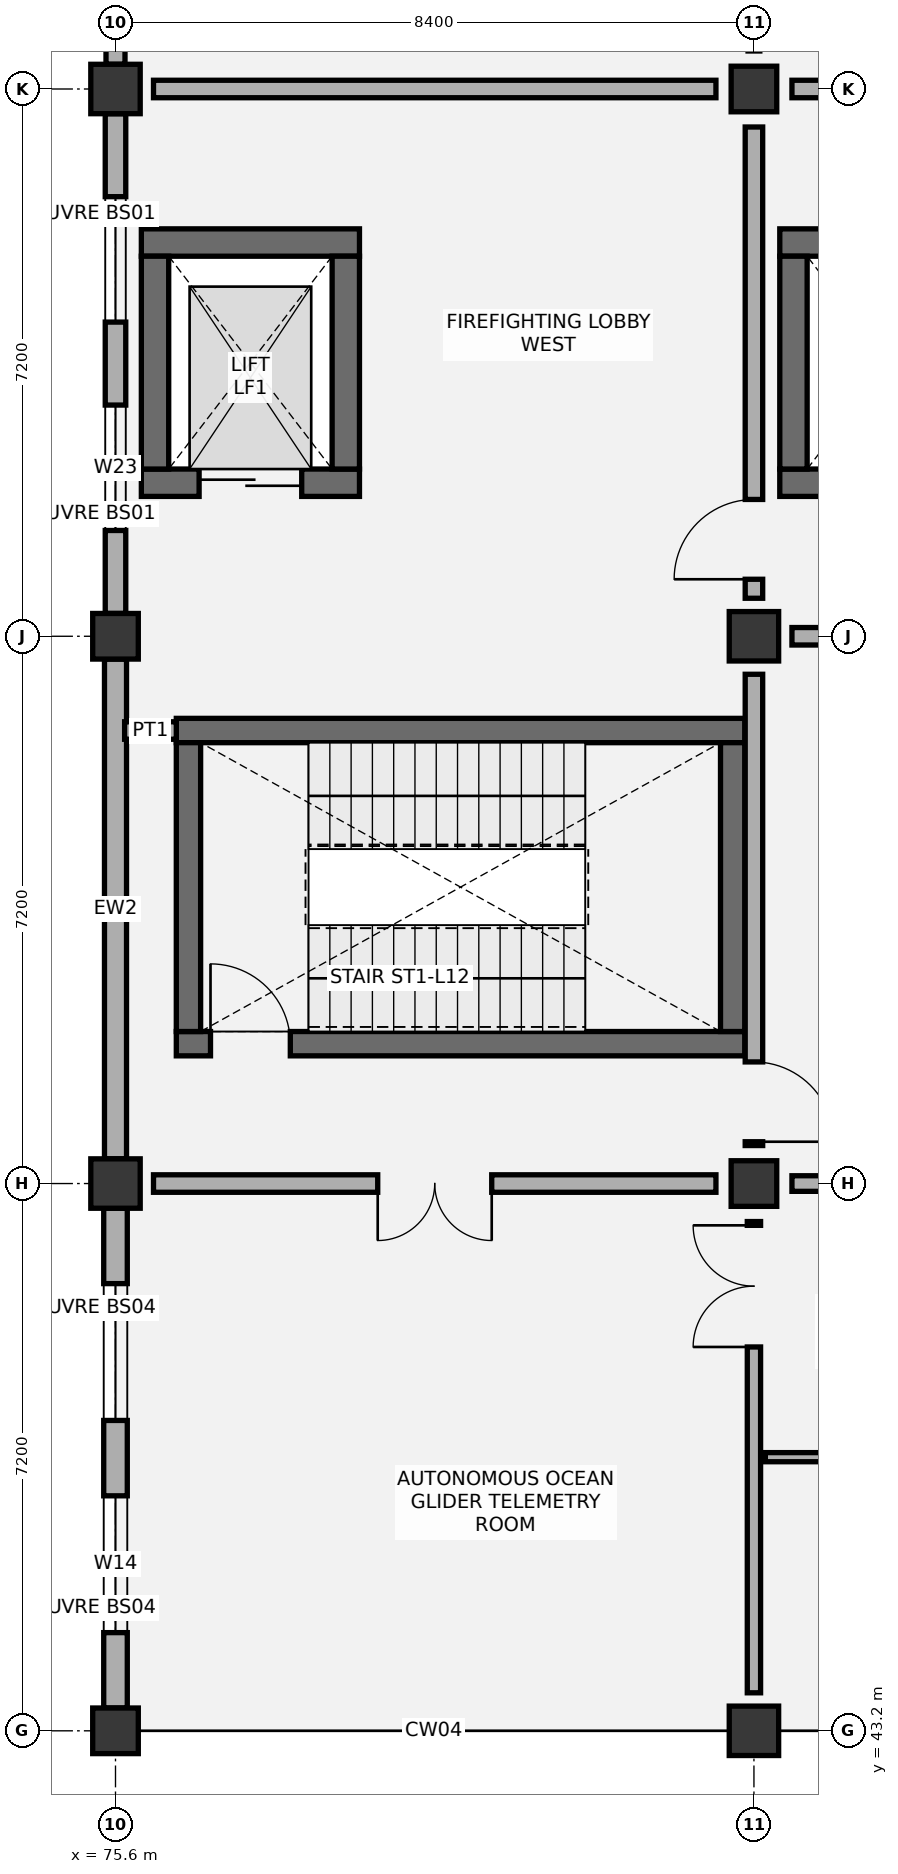
"""IFC4 building model, lengths in metres.
Left out: names, types, materials, properties, quantities, classifications, styles, units other than length and angle.
Written with IfcOpenShell. Run it as: python <this file> out.ifc"""

import sys

from ifc_helpers import new_model, si_unit, direction, frame, frame_2d, origin, origin_2d, place, context, subcontext, project, spatial, rectangle, extrude, element, fill, save


model = new_model("IFC4")
c1 = context("Model", 3, precision=1e-05, world=origin(), true_north=direction((0.0, 1.0)))
c2 = subcontext(c1, "Body", "Model", "MODEL_VIEW")
j1 = project(units=[si_unit("LENGTHUNIT", "METRE"), si_unit("PLANEANGLEUNIT", "RADIAN")], contexts=[c1])
p1 = place(None, origin())
s1 = spatial("IfcSite", under=j1, at=p1, CompositionType="ELEMENT")
p2 = place(p1, origin())
s2 = spatial("IfcBuilding", under=s1, at=p2, CompositionType="ELEMENT")
p3 = place(p2, frame((0.0, 0.0, 56.4)))
s3 = spatial("IfcBuildingStorey", under=s2, at=p3, CompositionType="ELEMENT", Elevation=56.4)
p4 = place(p3, frame((75.6, 43.2, 0.0), z_axis=(0.0, 0.0, 1.0), x_axis=(1.0, 0.0, 0.0)))
e1 = element("IfcColumn", 1, at=p4, inside=s3, PredefinedType="COLUMN", context=c2, shape_type="SweptSolid", body=[
    extrude(rectangle(XDim=0.6, YDim=0.6, at=origin_2d()), origin(), (0.0, 0.0, 1.0), 4.2),
])
p5 = place(p3, frame((75.6, 50.4, 0.0), z_axis=(0.0, 0.0, 1.0), x_axis=(1.0, 0.0, 0.0)))
e2 = element("IfcColumn", 2, at=p5, inside=s3, PredefinedType="COLUMN", context=c2, shape_type="SweptSolid", body=[
    extrude(rectangle(XDim=0.65, YDim=0.65, at=origin_2d()), origin(), (0.0, 0.0, 1.0), 4.2),
])
p6 = place(p3, frame((75.6, 57.6, 0.0), z_axis=(0.0, 0.0, 1.0), x_axis=(1.0, 0.0, 0.0)))
e3 = element("IfcColumn", 3, at=p6, inside=s3, PredefinedType="COLUMN", context=c2, shape_type="SweptSolid", body=[
    extrude(rectangle(XDim=0.6, YDim=0.6, at=origin_2d()), origin(), (0.0, 0.0, 1.0), 4.2),
])
for number, where, z_axis, x_axis in (
    (4, (75.6, 64.8, 0.0), (0.0, 0.0, 1.0), (1.0, 0.0, 0.0)),
    (5, (84.0, 43.2, 0.0), (0.0, 0.0, 1.0), (1.0, 0.0, 0.0)),
):
    element("IfcColumn", number, at=place(p3, frame(where, z_axis=z_axis, x_axis=x_axis)), inside=s3, PredefinedType="COLUMN", context=c2, shape_type="SweptSolid", body=[
        extrude(rectangle(XDim=0.65, YDim=0.65, at=origin_2d()), origin(), (0.0, 0.0, 1.0), 4.2),
    ])
p7 = place(p3, frame((84.0, 50.4, 0.0), z_axis=(0.0, 0.0, 1.0), x_axis=(1.0, 0.0, 0.0)))
e6 = element("IfcColumn", 6, at=p7, inside=s3, PredefinedType="COLUMN", context=c2, shape_type="SweptSolid", body=[
    extrude(rectangle(XDim=0.6, YDim=0.6, at=origin_2d()), origin(), (0.0, 0.0, 1.0), 4.2),
])
p8 = place(p3, frame((84.0, 57.6, 0.0), z_axis=(0.0, 0.0, 1.0), x_axis=(1.0, 0.0, 0.0)))
e7 = element("IfcColumn", 7, at=p8, inside=s3, PredefinedType="COLUMN", context=c2, shape_type="SweptSolid", body=[
    extrude(rectangle(XDim=0.65, YDim=0.65, at=origin_2d()), origin(), (0.0, 0.0, 1.0), 4.2),
])
p9 = place(p3, frame((84.0, 64.8, 0.0), z_axis=(0.0, 0.0, 1.0), x_axis=(1.0, 0.0, 0.0)))
e8 = element("IfcColumn", 8, at=p9, inside=s3, PredefinedType="COLUMN", context=c2, shape_type="SweptSolid", body=[
    extrude(rectangle(XDim=0.6, YDim=0.6, at=origin_2d()), origin(), (0.0, 0.0, 1.0), 4.2),
])
p10 = place(p3, frame((76.4, 52.24, 0.0), z_axis=(0.0, 0.0, 1.0), x_axis=(1.0, 0.0, 0.0)))
e9 = element("IfcWall", 9, at=p10, inside=s3, PredefinedType="SHEAR", context=c2, shape_type="SweptSolid", body=[
    extrude(rectangle(XDim=7.48, YDim=0.32, at=frame_2d((3.74, 0.0))), origin(), (0.0, 0.0, 1.0), 3.92),
])
p11 = place(p10, frame((0.45, 0.0, 0.0)))
e10 = element("IfcOpeningElement", 10, at=p11, cuts=e9, PredefinedType="OPENING", context=c2, shape_type="SweptSolid", body=[
    extrude(rectangle(XDim=1.05, YDim=2.15, at=frame_2d((0.525, 1.075))), frame((0.0, 0.17, 0.0), z_axis=(0.0, -1.0, 0.0), x_axis=(1.0, 0.0, 0.0)), (0.0, 0.0, 1.0), 0.34),
])
p12 = place(p3, frame((76.4, 56.36, 0.0), z_axis=(0.0, 0.0, 1.0), x_axis=(1.0, 0.0, 0.0)))
e11 = element("IfcWall", 11, at=p12, inside=s3, PredefinedType="SHEAR", context=c2, shape_type="SweptSolid", body=[
    extrude(rectangle(XDim=7.48, YDim=0.32, at=frame_2d((3.74, 0.0))), origin(), (0.0, 0.0, 1.0), 3.92),
])
for number, where, z_axis, x_axis in (
    (12, (76.56, 52.4, 0.0), (0.0, 0.0, 1.0), (0.0, 1.0, 0.0)),
    (13, (83.72, 52.4, 0.0), (0.0, 0.0, 1.0), (0.0, 1.0, 0.0)),
):
    element("IfcWall", number, at=place(p3, frame(where, z_axis=z_axis, x_axis=x_axis)), inside=s3, PredefinedType="SHEAR", context=c2, shape_type="SweptSolid", body=[
        extrude(rectangle(XDim=3.8, YDim=0.32, at=frame_2d((1.9, 0.0))), origin(), (0.0, 0.0, 1.0), 3.92),
    ])
p13 = place(p3, frame((75.94, 62.78, 0.0), z_axis=(0.0, 0.0, 1.0), x_axis=(1.0, 0.0, 0.0)))
e14 = element("IfcWall", 14, at=p13, inside=s3, PredefinedType="SHEAR", context=c2, shape_type="SweptSolid", body=[
    extrude(rectangle(XDim=2.87, YDim=0.36, at=frame_2d((1.435, 0.0))), origin(), (0.0, 0.0, 1.0), 3.92),
])
p14 = place(p3, frame((75.94, 59.62, 0.0), z_axis=(0.0, 0.0, 1.0), x_axis=(1.0, 0.0, 0.0)))
e15 = element("IfcWall", 15, at=p14, inside=s3, PredefinedType="SHEAR", context=c2, shape_type="SweptSolid", body=[
    extrude(rectangle(XDim=2.87, YDim=0.36, at=frame_2d((1.435, 0.0))), origin(), (0.0, 0.0, 1.0), 3.92),
])
p15 = place(p14, frame((0.76, 0.0, 0.0)))
e16 = element("IfcOpeningElement", 16, at=p15, cuts=e15, PredefinedType="OPENING", context=c2, shape_type="SweptSolid", body=[
    extrude(rectangle(XDim=1.35, YDim=2.2, at=frame_2d((0.675, 1.1))), frame((0.0, 0.19, 0.0), z_axis=(0.0, -1.0, 0.0), x_axis=(1.0, 0.0, 0.0)), (0.0, 0.0, 1.0), 0.38),
])
for number, where, z_axis, x_axis in (
    (17, (76.12, 59.8, 0.0), (0.0, 0.0, 1.0), (0.0, 1.0, 0.0)),
    (18, (78.63, 59.8, 0.0), (0.0, 0.0, 1.0), (0.0, 1.0, 0.0)),
):
    element("IfcWall", number, at=place(p3, frame(where, z_axis=z_axis, x_axis=x_axis)), inside=s3, PredefinedType="SHEAR", context=c2, shape_type="SweptSolid", body=[
        extrude(rectangle(XDim=2.8, YDim=0.36, at=frame_2d((1.4, 0.0))), origin(), (0.0, 0.0, 1.0), 3.92),
    ])
p16 = place(p3, frame((84.34, 62.78, 0.0), z_axis=(0.0, 0.0, 1.0), x_axis=(1.0, 0.0, 0.0)))
e19 = element("IfcWall", 19, at=p16, inside=s3, PredefinedType="SHEAR", context=c2, shape_type="SweptSolid", body=[
    extrude(rectangle(XDim=7.77, YDim=0.36, at=frame_2d((3.885, 0.0))), origin(), (0.0, 0.0, 1.0), 3.92),
])
p17 = place(p3, frame((84.34, 59.62, 0.0), z_axis=(0.0, 0.0, 1.0), x_axis=(1.0, 0.0, 0.0)))
e20 = element("IfcWall", 20, at=p17, inside=s3, PredefinedType="SHEAR", context=c2, shape_type="SweptSolid", body=[
    extrude(rectangle(XDim=2.66, YDim=0.36, at=frame_2d((1.33, 0.0))), origin(), (0.0, 0.0, 1.0), 3.92),
])
p18 = place(p17, frame((0.78, 0.0, 0.0)))
e21 = element("IfcOpeningElement", 21, at=p18, cuts=e20, PredefinedType="OPENING", context=c2, shape_type="SweptSolid", body=[
    extrude(rectangle(XDim=1.1, YDim=2.15, at=frame_2d((0.55, 1.075))), frame((0.0, 0.19, 0.0), z_axis=(0.0, -1.0, 0.0), x_axis=(1.0, 0.0, 0.0)), (0.0, 0.0, 1.0), 0.38),
])
p19 = place(p3, frame((84.52, 59.8, 0.0), z_axis=(0.0, 0.0, 1.0), x_axis=(0.0, 1.0, 0.0)))
e22 = element("IfcWall", 22, at=p19, inside=s3, PredefinedType="SHEAR", context=c2, shape_type="SweptSolid", body=[
    extrude(rectangle(XDim=2.8, YDim=0.36, at=frame_2d((1.4, 0.0))), origin(), (0.0, 0.0, 1.0), 3.92),
])
p20 = place(p3, frame((75.6, 43.5, 0.0), z_axis=(0.0, 0.0, 1.0), x_axis=(0.0, 1.0, 0.0)))
e23 = element("IfcWall", 23, at=p20, inside=s3, PredefinedType="SOLIDWALL", context=c2, shape_type="SweptSolid", body=[
    extrude(rectangle(XDim=6.575, YDim=0.31, at=frame_2d((3.288, 0.0))), origin(), (0.0, 0.0, 1.0), 3.365),
])
p21 = place(p20, frame((0.992, 0.0, 0.95)))
e24 = element("IfcOpeningElement", 24, at=p21, cuts=e23, PredefinedType="OPENING", context=c2, shape_type="SweptSolid", body=[
    extrude(rectangle(XDim=1.8, YDim=1.5, at=frame_2d((0.9, 0.75))), frame((0.0, 0.165, 0.0), z_axis=(0.0, -1.0, 0.0), x_axis=(1.0, 0.0, 0.0)), (0.0, 0.0, 1.0), 0.33),
])
p22 = place(p20, frame((3.783, 0.0, 0.95)))
e25 = element("IfcOpeningElement", 25, at=p22, cuts=e23, PredefinedType="OPENING", context=c2, shape_type="SweptSolid", body=[
    extrude(rectangle(XDim=1.8, YDim=1.5, at=frame_2d((0.9, 0.75))), frame((0.0, 0.165, 0.0), z_axis=(0.0, -1.0, 0.0), x_axis=(1.0, 0.0, 0.0)), (0.0, 0.0, 1.0), 0.33),
])
p23 = place(p3, frame((75.6, 50.725, 0.0), z_axis=(0.0, 0.0, 1.0), x_axis=(0.0, 1.0, 0.0)))
e26 = element("IfcWall", 26, at=p23, inside=s3, PredefinedType="SOLIDWALL", context=c2, shape_type="SweptSolid", body=[
    extrude(rectangle(XDim=6.575, YDim=0.29, at=frame_2d((3.288, 0.0))), origin(), (0.0, 0.0, 1.0), 3.365),
])
p24 = place(p3, frame((75.6, 57.9, 0.0), z_axis=(0.0, 0.0, 1.0), x_axis=(0.0, 1.0, 0.0)))
e27 = element("IfcWall", 27, at=p24, inside=s3, PredefinedType="SOLIDWALL", context=c2, shape_type="SweptSolid", body=[
    extrude(rectangle(XDim=6.575, YDim=0.27, at=frame_2d((3.288, 0.0))), origin(), (0.0, 0.0, 1.0), 3.365),
])
p25 = place(p24, frame((1.092, 0.0, 0.95)))
e28 = element("IfcOpeningElement", 28, at=p25, cuts=e27, PredefinedType="OPENING", context=c2, shape_type="SweptSolid", body=[
    extrude(rectangle(XDim=1.65, YDim=1.65, at=frame_2d((0.825, 0.825))), frame((0.0, 0.145, 0.0), z_axis=(0.0, -1.0, 0.0), x_axis=(1.0, 0.0, 0.0)), (0.0, 0.0, 1.0), 0.29),
])
p26 = place(p24, frame((3.833, 0.0, 0.95)))
e29 = element("IfcOpeningElement", 29, at=p26, cuts=e27, PredefinedType="OPENING", context=c2, shape_type="SweptSolid", body=[
    extrude(rectangle(XDim=1.65, YDim=1.65, at=frame_2d((0.825, 0.825))), frame((0.0, 0.145, 0.0), z_axis=(0.0, -1.0, 0.0), x_axis=(1.0, 0.0, 0.0)), (0.0, 0.0, 1.0), 0.29),
])
p27 = place(p3, frame((75.6, 65.125, 0.0), z_axis=(0.0, 0.0, 1.0), x_axis=(0.0, 1.0, 0.0)))
e30 = element("IfcWall", 30, at=p27, inside=s3, PredefinedType="SOLIDWALL", context=c2, shape_type="SweptSolid", body=[
    extrude(rectangle(XDim=6.575, YDim=0.25, at=frame_2d((3.288, 0.0))), origin(), (0.0, 0.0, 1.0), 3.365),
])
p28 = place(p27, frame((1.192, 0.0, 0.95)))
e31 = element("IfcOpeningElement", 31, at=p28, cuts=e30, PredefinedType="OPENING", context=c2, shape_type="SweptSolid", body=[
    extrude(rectangle(XDim=1.5, YDim=1.5, at=frame_2d((0.75, 0.75))), frame((0.0, 0.135, 0.0), z_axis=(0.0, -1.0, 0.0), x_axis=(1.0, 0.0, 0.0)), (0.0, 0.0, 1.0), 0.27),
])
p29 = place(p27, frame((3.883, 0.0, 0.95)))
e32 = element("IfcOpeningElement", 32, at=p29, cuts=e30, PredefinedType="OPENING", context=c2, shape_type="SweptSolid", body=[
    extrude(rectangle(XDim=1.5, YDim=1.5, at=frame_2d((0.75, 0.75))), frame((0.0, 0.135, 0.0), z_axis=(0.0, -1.0, 0.0), x_axis=(1.0, 0.0, 0.0)), (0.0, 0.0, 1.0), 0.27),
])
p30 = place(p3, frame((84.15, 46.8, 0.0), z_axis=(0.0, 0.0, 1.0), x_axis=(1.0, 0.0, 0.0)))
e33 = element("IfcWall", 33, at=p30, inside=s3, PredefinedType="PARTITIONING", context=c2, shape_type="SweptSolid", body=[
    extrude(rectangle(XDim=8.1, YDim=0.12, at=frame_2d((4.05, 0.0))), origin(), (0.0, 0.0, 1.0), 3.92),
])
p31 = place(p30, frame((3.55, 0.0, 0.0)))
e34 = element("IfcOpeningElement", 34, at=p31, cuts=e33, PredefinedType="OPENING", context=c2, shape_type="SweptSolid", body=[
    extrude(rectangle(XDim=1.6, YDim=2.2, at=frame_2d((0.8, 1.1))), frame((0.0, 0.07, 0.0), z_axis=(0.0, -1.0, 0.0), x_axis=(1.0, 0.0, 0.0)), (0.0, 0.0, 1.0), 0.14),
])
p32 = place(p3, frame((84.0, 43.7, 0.0), z_axis=(0.0, 0.0, 1.0), x_axis=(0.0, 1.0, 0.0)))
e35 = element("IfcWall", 35, at=p32, inside=s3, PredefinedType="PARTITIONING", context=c2, shape_type="SweptSolid", body=[
    extrude(rectangle(XDim=6.2, YDim=0.175, at=frame_2d((3.1, 0.0))), origin(), (0.0, 0.0, 1.0), 3.415),
])
p33 = place(p32, frame((4.55, 0.0, 0.0)))
e36 = element("IfcOpeningElement", 36, at=p33, cuts=e35, PredefinedType="OPENING", context=c2, shape_type="SweptSolid", body=[
    extrude(rectangle(XDim=1.6, YDim=2.2, at=frame_2d((0.8, 1.1))), frame((0.0, 0.097, 0.0), z_axis=(0.0, -1.0, 0.0), x_axis=(1.0, 0.0, 0.0)), (0.0, 0.0, 1.0), 0.195),
])
p34 = place(p3, frame((76.1, 50.4, 0.0), z_axis=(0.0, 0.0, 1.0), x_axis=(1.0, 0.0, 0.0)))
e37 = element("IfcWall", 37, at=p34, inside=s3, PredefinedType="PARTITIONING", context=c2, shape_type="SweptSolid", body=[
    extrude(rectangle(XDim=7.4, YDim=0.23, at=frame_2d((3.7, 0.0))), origin(), (0.0, 0.0, 1.0), 3.415),
])
p35 = place(p34, frame((2.95, 0.0, 0.0)))
e38 = element("IfcOpeningElement", 38, at=p35, cuts=e37, PredefinedType="OPENING", context=c2, shape_type="SweptSolid", body=[
    extrude(rectangle(XDim=1.5, YDim=2.15, at=frame_2d((0.75, 1.075))), frame((0.0, 0.125, 0.0), z_axis=(0.0, -1.0, 0.0), x_axis=(1.0, 0.0, 0.0)), (0.0, 0.0, 1.0), 0.25),
])
p36 = place(p3, frame((84.0, 50.9, 0.0), z_axis=(0.0, 0.0, 1.0), x_axis=(0.0, 1.0, 0.0)))
e39 = element("IfcWall", 39, at=p36, inside=s3, PredefinedType="PARTITIONING", context=c2, shape_type="SweptSolid", body=[
    extrude(rectangle(XDim=6.2, YDim=0.23, at=frame_2d((3.1, 0.0))), origin(), (0.0, 0.0, 1.0), 3.415),
])
p37 = place(p36, frame((0.05, 0.0, 0.0)))
e40 = element("IfcOpeningElement", 40, at=p37, cuts=e39, PredefinedType="OPENING", context=c2, shape_type="SweptSolid", body=[
    extrude(rectangle(XDim=1.05, YDim=2.15, at=frame_2d((0.525, 1.075))), frame((0.0, 0.125, 0.0), z_axis=(0.0, -1.0, 0.0), x_axis=(1.0, 0.0, 0.0)), (0.0, 0.0, 1.0), 0.25),
])
p38 = place(p3, frame((75.72, 56.36, 0.0), z_axis=(0.0, 0.0, 1.0), x_axis=(1.0, 0.0, 0.0)))
e41 = element("IfcWall", 41, at=p38, inside=s3, PredefinedType="PARTITIONING", context=c2, shape_type="SweptSolid", body=[
    extrude(rectangle(XDim=0.68, YDim=0.23, at=frame_2d((0.34, 0.0))), origin(), (0.0, 0.0, 1.0), 3.92),
])
p39 = place(p3, frame((84.0, 58.1, 0.0), z_axis=(0.0, 0.0, 1.0), x_axis=(0.0, 1.0, 0.0)))
e42 = element("IfcWall", 42, at=p39, inside=s3, PredefinedType="PARTITIONING", context=c2, shape_type="SweptSolid", body=[
    extrude(rectangle(XDim=6.2, YDim=0.23, at=frame_2d((3.1, 0.0))), origin(), (0.0, 0.0, 1.0), 3.515),
])
p40 = place(p39, frame((0.25, 0.0, 0.0)))
e43 = element("IfcOpeningElement", 43, at=p40, cuts=e42, PredefinedType="OPENING", context=c2, shape_type="SweptSolid", body=[
    extrude(rectangle(XDim=1.05, YDim=2.15, at=frame_2d((0.525, 1.075))), frame((0.0, 0.125, 0.0), z_axis=(0.0, -1.0, 0.0), x_axis=(1.0, 0.0, 0.0)), (0.0, 0.0, 1.0), 0.25),
])
p41 = place(p3, frame((76.1, 64.8, 0.0), z_axis=(0.0, 0.0, 1.0), x_axis=(1.0, 0.0, 0.0)))
e44 = element("IfcWall", 44, at=p41, inside=s3, PredefinedType="PARTITIONING", context=c2, shape_type="SweptSolid", body=[
    extrude(rectangle(XDim=7.4, YDim=0.23, at=frame_2d((3.7, 0.0))), origin(), (0.0, 0.0, 1.0), 3.415),
])
p42 = place(p3, frame((84.5, 50.4, 0.0), z_axis=(0.0, 0.0, 1.0), x_axis=(1.0, 0.0, 0.0)))
e45 = element("IfcWall", 45, at=p42, inside=s3, PredefinedType="PARTITIONING", context=c2, shape_type="SweptSolid", body=[
    extrude(rectangle(XDim=7.4, YDim=0.205, at=frame_2d((3.7, 0.0))), origin(), (0.0, 0.0, 1.0), 3.415),
])
p43 = place(p42, frame((3.025, 0.0, 0.0)))
e46 = element("IfcOpeningElement", 46, at=p43, cuts=e45, PredefinedType="OPENING", context=c2, shape_type="SweptSolid", body=[
    extrude(rectangle(XDim=1.35, YDim=2.15, at=frame_2d((0.675, 1.075))), frame((0.0, 0.113, 0.0), z_axis=(0.0, -1.0, 0.0), x_axis=(1.0, 0.0, 0.0)), (0.0, 0.0, 1.0), 0.225),
])
p44 = place(p3, frame((84.5, 57.6, 0.0), z_axis=(0.0, 0.0, 1.0), x_axis=(1.0, 0.0, 0.0)))
e47 = element("IfcWall", 47, at=p44, inside=s3, PredefinedType="PARTITIONING", context=c2, shape_type="SweptSolid", body=[
    extrude(rectangle(XDim=7.4, YDim=0.23, at=frame_2d((3.7, 0.0))), origin(), (0.0, 0.0, 1.0), 3.415),
])
p45 = place(p44, frame((2.95, 0.0, 0.0)))
e48 = element("IfcOpeningElement", 48, at=p45, cuts=e47, PredefinedType="OPENING", context=c2, shape_type="SweptSolid", body=[
    extrude(rectangle(XDim=1.5, YDim=2.15, at=frame_2d((0.75, 1.075))), frame((0.0, 0.125, 0.0), z_axis=(0.0, -1.0, 0.0), x_axis=(1.0, 0.0, 0.0)), (0.0, 0.0, 1.0), 0.25),
])
p46 = place(p3, frame((84.5, 64.8, 0.0), z_axis=(0.0, 0.0, 1.0), x_axis=(1.0, 0.0, 0.0)))
e49 = element("IfcWall", 49, at=p46, inside=s3, PredefinedType="PARTITIONING", context=c2, shape_type="SweptSolid", body=[
    extrude(rectangle(XDim=7.4, YDim=0.23, at=frame_2d((3.7, 0.0))), origin(), (0.0, 0.0, 1.0), 3.415),
])
p47 = place(p21, origin())
e50 = element("IfcWindow", 50, at=p47, inside=s3, PartitioningType="SINGLE_PANEL", PredefinedType="WINDOW", context=c2, shape_type="SweptSolid", body=[
    extrude(rectangle(XDim=1.8, YDim=1.5, at=frame_2d((0.9, 0.75))), frame((0.0, 0.03, 0.0), z_axis=(0.0, -1.0, 0.0), x_axis=(1.0, 0.0, 0.0)), (0.0, 0.0, 1.0), 0.06),
])
fill(e24, e50)
p48 = place(p22, origin())
e51 = element("IfcWindow", 51, at=p48, inside=s3, PartitioningType="SINGLE_PANEL", PredefinedType="WINDOW", context=c2, shape_type="SweptSolid", body=[
    extrude(rectangle(XDim=1.8, YDim=1.5, at=frame_2d((0.9, 0.75))), frame((0.0, 0.03, 0.0), z_axis=(0.0, -1.0, 0.0), x_axis=(1.0, 0.0, 0.0)), (0.0, 0.0, 1.0), 0.06),
])
fill(e25, e51)
p49 = place(p25, origin())
e52 = element("IfcWindow", 52, at=p49, inside=s3, PartitioningType="SINGLE_PANEL", PredefinedType="WINDOW", context=c2, shape_type="SweptSolid", body=[
    extrude(rectangle(XDim=1.65, YDim=1.65, at=frame_2d((0.825, 0.825))), frame((0.0, 0.03, 0.0), z_axis=(0.0, -1.0, 0.0), x_axis=(1.0, 0.0, 0.0)), (0.0, 0.0, 1.0), 0.06),
])
fill(e28, e52)
p50 = place(p26, origin())
e53 = element("IfcWindow", 53, at=p50, inside=s3, PartitioningType="SINGLE_PANEL", PredefinedType="WINDOW", context=c2, shape_type="SweptSolid", body=[
    extrude(rectangle(XDim=1.65, YDim=1.65, at=frame_2d((0.825, 0.825))), frame((0.0, 0.03, 0.0), z_axis=(0.0, -1.0, 0.0), x_axis=(1.0, 0.0, 0.0)), (0.0, 0.0, 1.0), 0.06),
])
fill(e29, e53)
p51 = place(p11, origin())
e54 = element("IfcDoor", 54, at=p51, inside=s3, OperationType="SINGLE_SWING_LEFT", PredefinedType="DOOR", context=c2, shape_type="SweptSolid", body=[
    extrude(rectangle(XDim=1.05, YDim=2.15, at=frame_2d((0.525, 1.075))), frame((0.0, 0.025, 0.0), z_axis=(0.0, -1.0, 0.0), x_axis=(1.0, 0.0, 0.0)), (0.0, 0.0, 1.0), 0.05),
])
fill(e10, e54)
p52 = place(p15, origin())
e55 = element("IfcDoor", 55, at=p52, inside=s3, OperationType="DOUBLE_DOOR_SLIDING", PredefinedType="DOOR", context=c2, shape_type="SweptSolid", body=[
    extrude(rectangle(XDim=1.35, YDim=2.2, at=frame_2d((0.675, 1.1))), frame((0.0, 0.025, 0.0), z_axis=(0.0, -1.0, 0.0), x_axis=(1.0, 0.0, 0.0)), (0.0, 0.0, 1.0), 0.05),
])
fill(e16, e55)
p53 = place(p33, origin())
e56 = element("IfcDoor", 56, at=p53, inside=s3, OperationType="DOUBLE_DOOR_SINGLE_SWING", PredefinedType="DOOR", context=c2, shape_type="SweptSolid", body=[
    extrude(rectangle(XDim=1.6, YDim=2.2, at=frame_2d((0.8, 1.1))), frame((0.0, 0.025, 0.0), z_axis=(0.0, -1.0, 0.0), x_axis=(1.0, 0.0, 0.0)), (0.0, 0.0, 1.0), 0.05),
])
fill(e36, e56)
p54 = place(p35, frame((1.5, 0.0, 0.0), z_axis=(0.0, 0.0, 1.0), x_axis=(-1.0, 0.0, 0.0)))
e57 = element("IfcDoor", 57, at=p54, inside=s3, OperationType="DOUBLE_DOOR_SINGLE_SWING", PredefinedType="DOOR", context=c2, shape_type="SweptSolid", body=[
    extrude(rectangle(XDim=1.5, YDim=2.15, at=frame_2d((0.75, 1.075))), frame((0.0, 0.025, 0.0), z_axis=(0.0, -1.0, 0.0), x_axis=(1.0, 0.0, 0.0)), (0.0, 0.0, 1.0), 0.05),
])
fill(e38, e57)
p55 = place(p37, frame((1.05, 0.0, 0.0), z_axis=(0.0, 0.0, 1.0), x_axis=(-1.0, 0.0, 0.0)))
e58 = element("IfcDoor", 58, at=p55, inside=s3, OperationType="SINGLE_SWING_RIGHT", PredefinedType="DOOR", context=c2, shape_type="SweptSolid", body=[
    extrude(rectangle(XDim=1.05, YDim=2.15, at=frame_2d((0.525, 1.075))), frame((0.0, 0.025, 0.0), z_axis=(0.0, -1.0, 0.0), x_axis=(1.0, 0.0, 0.0)), (0.0, 0.0, 1.0), 0.05),
])
fill(e40, e58)
p56 = place(p40, origin())
e59 = element("IfcDoor", 59, at=p56, inside=s3, OperationType="SINGLE_SWING_LEFT", PredefinedType="DOOR", context=c2, shape_type="SweptSolid", body=[
    extrude(rectangle(XDim=1.05, YDim=2.15, at=frame_2d((0.525, 1.075))), frame((0.0, 0.025, 0.0), z_axis=(0.0, -1.0, 0.0), x_axis=(1.0, 0.0, 0.0)), (0.0, 0.0, 1.0), 0.05),
])
fill(e43, e59)
save(model, sys.argv[1])
